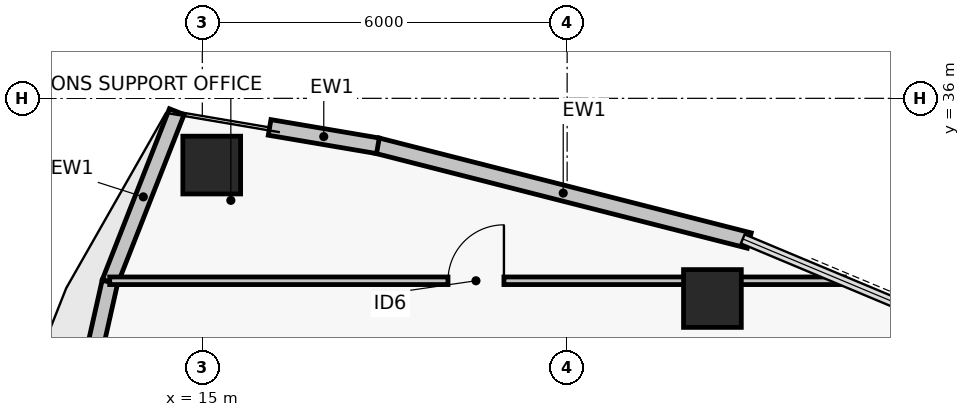
"""IFC4 building model, lengths in metres.
Left out: names, types, materials, properties, quantities, classifications, styles, units other than length and angle.
Written with IfcOpenShell. Run it as: python <this file> out.ifc"""

import sys

from ifc_helpers import new_model, si_unit, direction, frame, frame_2d, origin, origin_2d, place, context, subcontext, project, spatial, rectangle, hollow_rectangle, extrude, element, fill, save


model = new_model("IFC4")
c1 = context("Model", 3, precision=1e-05, world=origin(), true_north=direction((0.0, 1.0)))
c2 = subcontext(c1, "Body", "Model", "MODEL_VIEW")
j1 = project(units=[si_unit("LENGTHUNIT", "METRE"), si_unit("PLANEANGLEUNIT", "RADIAN")], contexts=[c1])
p1 = place(None, origin())
s1 = spatial("IfcSite", under=j1, at=p1, CompositionType="ELEMENT")
p2 = place(p1, origin())
s2 = spatial("IfcBuilding", under=s1, at=p2, CompositionType="ELEMENT")
p3 = place(p2, frame((0.0, 0.0, 184.08)))
s3 = spatial("IfcBuildingStorey", under=s2, at=p3, CompositionType="ELEMENT", Elevation=184.08)
for number, where, z_axis, x_axis in (
    (1, (23.389, 32.708, 0.0), (0.0, 0.0, 1.0), (1.0, 0.0, 0.0)),
    (2, (15.155, 34.903, 0.0), (0.0, 0.0, 1.0), (1.0, 0.0, 0.0)),
):
    element("IfcColumn", number, at=place(p3, frame(where, z_axis=z_axis, x_axis=x_axis)), inside=s3, PredefinedType="COLUMN", context=c2, shape_type="SweptSolid", body=[
        extrude(hollow_rectangle(XDim=0.95, YDim=0.95, WallThickness=0.04, at=origin_2d()), origin(), (0.0, 0.0, 1.0), 3.72),
    ])
p4 = place(p3, frame((17.876, 35.222, 0.0), z_axis=(0.0, 0.0, 1.0), x_axis=(0.968976240439, -0.247153890246, 0.0)))
e3 = element("IfcWall", 3, at=p4, inside=s3, PredefinedType="PARTITIONING", context=c2, shape_type="SweptSolid", body=[
    extrude(rectangle(XDim=6.315, YDim=0.26, at=frame_2d((3.157, 0.0))), origin(), (0.0, 0.0, 1.0), 3.5),
])
p5 = place(p3, frame((16.107, 35.522, 0.0), z_axis=(0.0, 0.0, 1.0), x_axis=(0.985877723898, -0.167466753484, 0.0)))
e4 = element("IfcWall", 4, at=p5, inside=s3, PredefinedType="PARTITIONING", context=c2, shape_type="SweptSolid", body=[
    extrude(rectangle(XDim=1.806, YDim=0.26, at=frame_2d((0.903, 0.0))), origin(), (0.0, 0.0, 1.0), 3.5),
])
p6 = place(p3, frame((13.479, 32.979, 0.0), z_axis=(0.0, 0.0, 1.0), x_axis=(0.365609724313, 0.930768246927, 0.0)))
e5 = element("IfcWall", 5, at=p6, inside=s3, PredefinedType="PARTITIONING", context=c2, shape_type="SweptSolid", body=[
    extrude(rectangle(XDim=3.011, YDim=0.26, at=frame_2d((1.505, 0.0))), origin(), (0.0, 0.0, 1.0), 3.5),
])
p7 = place(p3, frame((12.22, 27.382, 0.0), z_axis=(0.0, 0.0, 1.0), x_axis=(0.219475737697, 0.975617958303, 0.0)))
e6 = element("IfcWall", 6, at=p7, inside=s3, PredefinedType="PARTITIONING", context=c2, shape_type="SweptSolid", body=[
    extrude(rectangle(XDim=5.737, YDim=0.26, at=frame_2d((2.868, 0.0))), origin(), (0.0, 0.0, 1.0), 3.5),
])
p8 = place(p3, frame((13.477, 33.0, 0.0), z_axis=(0.0, 0.0, 1.0), x_axis=(1.0, 0.0, 0.0)))
e7 = element("IfcWall", 7, at=p8, inside=s3, PredefinedType="PARTITIONING", context=c2, shape_type="SweptSolid", body=[
    extrude(rectangle(XDim=12.084, YDim=0.125, at=frame_2d((6.042, 0.0))), origin(), (0.0, 0.0, 1.0), 2.73),
])
p9 = place(p8, frame((5.564, 0.0, 0.0)))
e8 = element("IfcOpeningElement", 8, at=p9, cuts=e7, PredefinedType="OPENING", context=c2, shape_type="SweptSolid", body=[
    extrude(rectangle(XDim=0.92, YDim=2.05, at=frame_2d((0.46, 1.025))), frame((0.0, 0.073, 0.0), z_axis=(0.0, -1.0, 0.0), x_axis=(1.0, 0.0, 0.0)), (0.0, 0.0, 1.0), 0.145),
])
p10 = place(p9, origin())
e9 = element("IfcDoor", 9, at=p10, inside=s3, OperationType="SINGLE_SWING_RIGHT", PredefinedType="DOOR", context=c2, shape_type="SweptSolid", body=[
    extrude(rectangle(XDim=0.92, YDim=2.05, at=frame_2d((0.46, 1.025))), frame((0.0, 0.025, 0.0), z_axis=(0.0, -1.0, 0.0), x_axis=(1.0, 0.0, 0.0)), (0.0, 0.0, 1.0), 0.05),
])
fill(e8, e9)
save(model, sys.argv[1])
